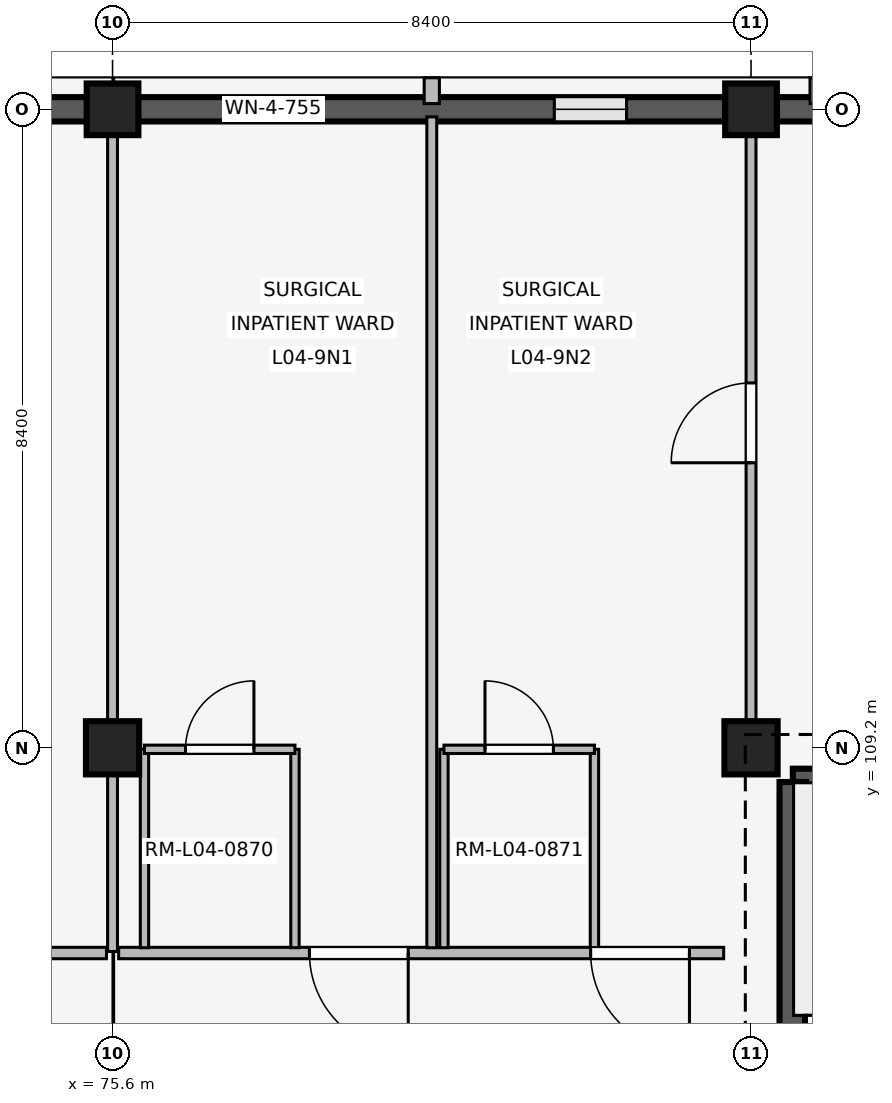
"""IFC4 building model, lengths in metres.
Left out: names, types, materials, properties, quantities, classifications, styles, units other than length and angle.
Written with IfcOpenShell. Run it as: python <this file> out.ifc"""

import sys

from ifc_helpers import new_model, si_unit, direction, frame, frame_2d, origin, origin_2d, place, context, subcontext, project, spatial, rectangle, extrude, element, fill, save


model = new_model("IFC4")
c1 = context("Model", 3, precision=1e-05, world=origin(), true_north=direction((0.0, 1.0)))
c2 = subcontext(c1, "Body", "Model", "MODEL_VIEW")
j1 = project(units=[si_unit("LENGTHUNIT", "METRE"), si_unit("PLANEANGLEUNIT", "RADIAN")], contexts=[c1])
p1 = place(None, origin())
s1 = spatial("IfcSite", under=j1, at=p1, CompositionType="ELEMENT")
p2 = place(p1, origin())
s2 = spatial("IfcBuilding", under=s1, at=p2, CompositionType="ELEMENT")
p3 = place(p2, frame((0.0, 0.0, 16.2)))
s3 = spatial("IfcBuildingStorey", under=s2, at=p3, CompositionType="ELEMENT", Elevation=16.2)
p4 = place(p3, frame((75.6, 109.2, 0.0), z_axis=(0.0, 0.0, 1.0), x_axis=(1.0, 0.0, 0.0)))
e1 = element("IfcColumn", 1, at=p4, inside=s3, PredefinedType="COLUMN", context=c2, shape_type="SweptSolid", body=[
    extrude(rectangle(XDim=0.7, YDim=0.7, at=origin_2d()), origin(), (0.0, 0.0, 1.0), 4.2),
])
p5 = place(p3, frame((75.6, 117.6, 0.0), z_axis=(0.0, 0.0, 1.0), x_axis=(1.0, 0.0, 0.0)))
e2 = element("IfcColumn", 2, at=p5, inside=s3, PredefinedType="COLUMN", context=c2, shape_type="SweptSolid", body=[
    extrude(rectangle(XDim=0.68, YDim=0.68, at=origin_2d()), origin(), (0.0, 0.0, 1.0), 4.2),
])
p6 = place(p3, frame((84.0, 109.2, 0.0), z_axis=(0.0, 0.0, 1.0), x_axis=(1.0, 0.0, 0.0)))
e3 = element("IfcColumn", 3, at=p6, inside=s3, PredefinedType="COLUMN", context=c2, shape_type="SweptSolid", body=[
    extrude(rectangle(XDim=0.7, YDim=0.7, at=origin_2d()), origin(), (0.0, 0.0, 1.0), 4.2),
])
p7 = place(p3, frame((84.0, 117.6, 0.0), z_axis=(0.0, 0.0, 1.0), x_axis=(1.0, 0.0, 0.0)))
e4 = element("IfcColumn", 4, at=p7, inside=s3, PredefinedType="COLUMN", context=c2, shape_type="SweptSolid", body=[
    extrude(rectangle(XDim=0.68, YDim=0.68, at=origin_2d()), origin(), (0.0, 0.0, 1.0), 4.2),
])
p8 = place(p3, frame((67.535, 117.6, 0.0), z_axis=(0.0, 0.0, 1.0), x_axis=(1.0, 0.0, 0.0)))
e5 = element("IfcWall", 5, at=p8, inside=s3, PredefinedType="SOLIDWALL", context=c2, shape_type="SweptSolid", body=[
    extrude(rectangle(XDim=7.73, YDim=0.32, at=frame_2d((3.865, 0.0))), origin(), (0.0, 0.0, 1.0), 3.32),
])
p9 = place(p8, frame((1.453, 0.0, 0.85)))
e6 = element("IfcOpeningElement", 6, at=p9, cuts=e5, PredefinedType="OPENING", context=c2, shape_type="SweptSolid", body=[
    extrude(rectangle(XDim=0.65, YDim=1.75, at=frame_2d((0.325, 0.875))), frame((0.0, 0.17, 0.0), z_axis=(0.0, -1.0, 0.0), x_axis=(1.0, 0.0, 0.0)), (0.0, 0.0, 1.0), 0.34),
])
p10 = place(p8, frame((5.627, 0.0, 0.85)))
e7 = element("IfcOpeningElement", 7, at=p10, cuts=e5, PredefinedType="OPENING", context=c2, shape_type="SweptSolid", body=[
    extrude(rectangle(XDim=0.65, YDim=1.75, at=frame_2d((0.325, 0.875))), frame((0.0, 0.17, 0.0), z_axis=(0.0, -1.0, 0.0), x_axis=(1.0, 0.0, 0.0)), (0.0, 0.0, 1.0), 0.34),
])
p11 = place(p3, frame((75.935, 117.6, 0.0), z_axis=(0.0, 0.0, 1.0), x_axis=(1.0, 0.0, 0.0)))
e8 = element("IfcWall", 8, at=p11, inside=s3, PredefinedType="SOLIDWALL", context=c2, shape_type="SweptSolid", body=[
    extrude(rectangle(XDim=7.73, YDim=0.32, at=frame_2d((3.865, 0.0))), origin(), (0.0, 0.0, 1.0), 3.32),
])
p12 = place(p11, frame((1.303, 0.0, 0.85)))
e9 = element("IfcOpeningElement", 9, at=p12, cuts=e8, PredefinedType="OPENING", context=c2, shape_type="SweptSolid", body=[
    extrude(rectangle(XDim=0.95, YDim=1.6, at=frame_2d((0.475, 0.8))), frame((0.0, 0.17, 0.0), z_axis=(0.0, -1.0, 0.0), x_axis=(1.0, 0.0, 0.0)), (0.0, 0.0, 1.0), 0.34),
])
p13 = place(p11, frame((5.477, 0.0, 0.85)))
e10 = element("IfcOpeningElement", 10, at=p13, cuts=e8, PredefinedType="OPENING", context=c2, shape_type="SweptSolid", body=[
    extrude(rectangle(XDim=0.95, YDim=1.6, at=frame_2d((0.475, 0.8))), frame((0.0, 0.17, 0.0), z_axis=(0.0, -1.0, 0.0), x_axis=(1.0, 0.0, 0.0)), (0.0, 0.0, 1.0), 0.34),
])
p14 = place(p3, frame((79.8, 117.675, 0.0), z_axis=(0.0, 0.0, 1.0), x_axis=(0.0, 1.0, 0.0)))
e11 = element("IfcWall", 11, at=p14, inside=s3, PredefinedType="ELEMENTEDWALL", context=c2, shape_type="SweptSolid", body=[
    extrude(rectangle(XDim=0.34, YDim=0.2, at=frame_2d((0.17, 0.0))), origin(), (0.0, 0.0, 1.0), 3.3),
])
p15 = place(p3, frame((84.335, 117.6, 0.0), z_axis=(0.0, 0.0, 1.0), x_axis=(1.0, 0.0, 0.0)))
e12 = element("IfcWall", 12, at=p15, inside=s3, PredefinedType="SOLIDWALL", context=c2, shape_type="SweptSolid", body=[
    extrude(rectangle(XDim=7.73, YDim=0.32, at=frame_2d((3.865, 0.0))), origin(), (0.0, 0.0, 1.0), 3.32),
])
p16 = place(p15, frame((1.228, 0.0, 0.85)))
e13 = element("IfcOpeningElement", 13, at=p16, cuts=e12, PredefinedType="OPENING", context=c2, shape_type="SweptSolid", body=[
    extrude(rectangle(XDim=1.1, YDim=1.6, at=frame_2d((0.55, 0.8))), frame((0.0, 0.17, 0.0), z_axis=(0.0, -1.0, 0.0), x_axis=(1.0, 0.0, 0.0)), (0.0, 0.0, 1.0), 0.34),
])
p17 = place(p15, frame((5.402, 0.0, 0.85)))
e14 = element("IfcOpeningElement", 14, at=p17, cuts=e12, PredefinedType="OPENING", context=c2, shape_type="SweptSolid", body=[
    extrude(rectangle(XDim=1.1, YDim=1.6, at=frame_2d((0.55, 0.8))), frame((0.0, 0.17, 0.0), z_axis=(0.0, -1.0, 0.0), x_axis=(1.0, 0.0, 0.0)), (0.0, 0.0, 1.0), 0.34),
])
p18 = place(p3, frame((84.876, 117.675, 0.0), z_axis=(0.0, 0.0, 1.0), x_axis=(0.0, 1.0, 0.0)))
e15 = element("IfcWall", 15, at=p18, inside=s3, PredefinedType="ELEMENTEDWALL", context=c2, shape_type="SweptSolid", body=[
    extrude(rectangle(XDim=0.34, YDim=0.2, at=frame_2d((0.17, 0.0))), origin(), (0.0, 0.0, 1.0), 3.3),
])
p19 = place(p3, frame((84.55, 108.75, 0.0), z_axis=(0.0, 0.0, 1.0), x_axis=(1.0, 0.0, 0.0)))
e16 = element("IfcWall", 16, at=p19, inside=s3, PredefinedType="SHEAR", context=c2, shape_type="SweptSolid", body=[
    extrude(rectangle(XDim=7.5, YDim=0.35, at=frame_2d((3.75, 0.0))), origin(), (0.0, 0.0, 1.0), 3.92),
])
p20 = place(p3, frame((84.55, 101.2, 0.0), z_axis=(0.0, 0.0, 1.0), x_axis=(0.0, 1.0, 0.0)))
e17 = element("IfcWall", 17, at=p20, inside=s3, PredefinedType="SHEAR", context=c2, shape_type="SweptSolid", body=[
    extrude(rectangle(XDim=7.55, YDim=0.35, at=frame_2d((3.775, 0.0))), origin(), (0.0, 0.0, 1.0), 3.92),
])
p21 = place(p20, frame((0.28, 0.0, 0.0)))
e18 = element("IfcOpeningElement", 18, at=p21, cuts=e17, PredefinedType="OPENING", context=c2, shape_type="SweptSolid", body=[
    extrude(rectangle(XDim=1.0, YDim=2.15, at=frame_2d((0.5, 1.075))), frame((0.0, 0.185, 0.0), z_axis=(0.0, -1.0, 0.0), x_axis=(1.0, 0.0, 0.0)), (0.0, 0.0, 1.0), 0.37),
])
p22 = place(p3, frame((75.52, 106.5, 0.0), z_axis=(0.0, 0.0, 1.0), x_axis=(-1.0, 0.0, 0.0)))
e19 = element("IfcWall", 19, at=p22, inside=s3, PredefinedType="PARTITIONING", context=c2, shape_type="SweptSolid", body=[
    extrude(rectangle(XDim=8.24, YDim=0.15, at=frame_2d((4.12, 0.0))), origin(), (0.0, 0.0, 1.0), 3.3),
])
p23 = place(p22, frame((3.495, 0.0, 0.0)))
e20 = element("IfcOpeningElement", 20, at=p23, cuts=e19, PredefinedType="OPENING", context=c2, shape_type="SweptSolid", body=[
    extrude(rectangle(XDim=1.25, YDim=2.2, at=frame_2d((0.625, 1.1))), frame((0.0, 0.085, 0.0), z_axis=(0.0, -1.0, 0.0), x_axis=(1.0, 0.0, 0.0)), (0.0, 0.0, 1.0), 0.17),
])
p24 = place(p3, frame((75.6, 106.52, 0.0), z_axis=(0.0, 0.0, 1.0), x_axis=(0.0, 1.0, 0.0)))
e21 = element("IfcWall", 21, at=p24, inside=s3, PredefinedType="PARTITIONING", context=c2, shape_type="SweptSolid", body=[
    extrude(rectangle(XDim=10.94, YDim=0.13, at=frame_2d((5.47, 0.0))), origin(), (0.0, 0.0, 1.0), 3.3),
])
p25 = place(p3, frame((83.64, 106.5, 0.0), z_axis=(0.0, 0.0, 1.0), x_axis=(-1.0, 0.0, 0.0)))
e22 = element("IfcWall", 22, at=p25, inside=s3, PredefinedType="PARTITIONING", context=c2, shape_type="SweptSolid", body=[
    extrude(rectangle(XDim=7.96, YDim=0.15, at=frame_2d((3.98, 0.0))), origin(), (0.0, 0.0, 1.0), 3.3),
])
p26 = place(p25, frame((0.45, 0.0, 0.0)))
e23 = element("IfcOpeningElement", 23, at=p26, cuts=e22, PredefinedType="OPENING", context=c2, shape_type="SweptSolid", body=[
    extrude(rectangle(XDim=1.3, YDim=2.25, at=frame_2d((0.65, 1.125))), frame((0.0, 0.085, 0.0), z_axis=(0.0, -1.0, 0.0), x_axis=(1.0, 0.0, 0.0)), (0.0, 0.0, 1.0), 0.17),
])
p27 = place(p25, frame((4.15, 0.0, 0.0)))
e24 = element("IfcOpeningElement", 24, at=p27, cuts=e22, PredefinedType="OPENING", context=c2, shape_type="SweptSolid", body=[
    extrude(rectangle(XDim=1.3, YDim=2.25, at=frame_2d((0.65, 1.125))), frame((0.0, 0.085, 0.0), z_axis=(0.0, -1.0, 0.0), x_axis=(1.0, 0.0, 0.0)), (0.0, 0.0, 1.0), 0.17),
])
p28 = place(p3, frame((79.8, 106.57, 0.0), z_axis=(0.0, 0.0, 1.0), x_axis=(0.0, 1.0, 0.0)))
e25 = element("IfcWall", 25, at=p28, inside=s3, PredefinedType="PARTITIONING", context=c2, shape_type="SweptSolid", body=[
    extrude(rectangle(XDim=10.93, YDim=0.13, at=frame_2d((5.465, 0.0))), origin(), (0.0, 0.0, 1.0), 3.3),
])
for number, where, z_axis, x_axis in (
    (26, (76.02, 106.57, 0.0), (0.0, 0.0, 1.0), (0.0, 1.0, 0.0)),
    (27, (78.0, 106.57, 0.0), (0.0, 0.0, 1.0), (0.0, 1.0, 0.0)),
):
    element("IfcWall", number, at=place(p3, frame(where, z_axis=z_axis, x_axis=x_axis)), inside=s3, PredefinedType="PARTITIONING", context=c2, shape_type="SweptSolid", body=[
        extrude(rectangle(XDim=2.61, YDim=0.11, at=frame_2d((1.305, 0.0))), origin(), (0.0, 0.0, 1.0), 3.3),
    ])
p29 = place(p3, frame((76.02, 109.18, 0.0), z_axis=(0.0, 0.0, 1.0), x_axis=(1.0, 0.0, 0.0)))
e28 = element("IfcWall", 28, at=p29, inside=s3, PredefinedType="PARTITIONING", context=c2, shape_type="SweptSolid", body=[
    extrude(rectangle(XDim=1.98, YDim=0.11, at=frame_2d((0.99, 0.0))), origin(), (0.0, 0.0, 1.0), 3.3),
])
p30 = place(p29, frame((0.54, 0.0, 0.0)))
e29 = element("IfcOpeningElement", 29, at=p30, cuts=e28, PredefinedType="OPENING", context=c2, shape_type="SweptSolid", body=[
    extrude(rectangle(XDim=0.9, YDim=2.1, at=frame_2d((0.45, 1.05))), frame((0.0, 0.065, 0.0), z_axis=(0.0, -1.0, 0.0), x_axis=(1.0, 0.0, 0.0)), (0.0, 0.0, 1.0), 0.13),
])
for number, where, z_axis, x_axis in (
    (30, (79.96, 106.57, 0.0), (0.0, 0.0, 1.0), (0.0, 1.0, 0.0)),
    (31, (81.94, 106.57, 0.0), (0.0, 0.0, 1.0), (0.0, 1.0, 0.0)),
):
    element("IfcWall", number, at=place(p3, frame(where, z_axis=z_axis, x_axis=x_axis)), inside=s3, PredefinedType="PARTITIONING", context=c2, shape_type="SweptSolid", body=[
        extrude(rectangle(XDim=2.61, YDim=0.11, at=frame_2d((1.305, 0.0))), origin(), (0.0, 0.0, 1.0), 3.3),
    ])
p31 = place(p3, frame((79.96, 109.18, 0.0), z_axis=(0.0, 0.0, 1.0), x_axis=(1.0, 0.0, 0.0)))
e32 = element("IfcWall", 32, at=p31, inside=s3, PredefinedType="PARTITIONING", context=c2, shape_type="SweptSolid", body=[
    extrude(rectangle(XDim=1.98, YDim=0.11, at=frame_2d((0.99, 0.0))), origin(), (0.0, 0.0, 1.0), 3.3),
])
p32 = place(p31, frame((0.54, 0.0, 0.0)))
e33 = element("IfcOpeningElement", 33, at=p32, cuts=e32, PredefinedType="OPENING", context=c2, shape_type="SweptSolid", body=[
    extrude(rectangle(XDim=0.9, YDim=2.1, at=frame_2d((0.45, 1.05))), frame((0.0, 0.065, 0.0), z_axis=(0.0, -1.0, 0.0), x_axis=(1.0, 0.0, 0.0)), (0.0, 0.0, 1.0), 0.13),
])
p33 = place(p3, frame((84.0, 109.55, 0.0), z_axis=(0.0, 0.0, 1.0), x_axis=(0.0, 1.0, 0.0)))
e34 = element("IfcWall", 34, at=p33, inside=s3, PredefinedType="PARTITIONING", context=c2, shape_type="SweptSolid", body=[
    extrude(rectangle(XDim=7.91, YDim=0.13, at=frame_2d((3.955, 0.0))), origin(), (0.0, 0.0, 1.0), 3.3),
])
p34 = place(p33, frame((3.4, 0.0, 0.0)))
e35 = element("IfcOpeningElement", 35, at=p34, cuts=e34, PredefinedType="OPENING", context=c2, shape_type="SweptSolid", body=[
    extrude(rectangle(XDim=1.05, YDim=2.2, at=frame_2d((0.525, 1.1))), frame((0.0, 0.075, 0.0), z_axis=(0.0, -1.0, 0.0), x_axis=(1.0, 0.0, 0.0)), (0.0, 0.0, 1.0), 0.15),
])
p35 = place(p12, origin())
e36 = element("IfcWindow", 36, at=p35, inside=s3, PartitioningType="SINGLE_PANEL", PredefinedType="WINDOW", context=c2, shape_type="SweptSolid", body=[
    extrude(rectangle(XDim=0.95, YDim=1.6, at=frame_2d((0.475, 0.8))), frame((0.0, 0.03, 0.0), z_axis=(0.0, -1.0, 0.0), x_axis=(1.0, 0.0, 0.0)), (0.0, 0.0, 1.0), 0.06),
])
fill(e9, e36)
p36 = place(p13, origin())
e37 = element("IfcWindow", 37, at=p36, inside=s3, PartitioningType="SINGLE_PANEL", PredefinedType="WINDOW", context=c2, shape_type="SweptSolid", body=[
    extrude(rectangle(XDim=0.95, YDim=1.6, at=frame_2d((0.475, 0.8))), frame((0.0, 0.03, 0.0), z_axis=(0.0, -1.0, 0.0), x_axis=(1.0, 0.0, 0.0)), (0.0, 0.0, 1.0), 0.06),
])
fill(e10, e37)
p37 = place(p26, origin())
e38 = element("IfcDoor", 38, at=p37, inside=s3, OperationType="SINGLE_SWING_LEFT", PredefinedType="DOOR", context=c2, shape_type="SweptSolid", body=[
    extrude(rectangle(XDim=1.3, YDim=2.25, at=frame_2d((0.65, 1.125))), frame((0.0, 0.025, 0.0), z_axis=(0.0, -1.0, 0.0), x_axis=(1.0, 0.0, 0.0)), (0.0, 0.0, 1.0), 0.05),
])
fill(e23, e38)
p38 = place(p27, origin())
e39 = element("IfcDoor", 39, at=p38, inside=s3, OperationType="SINGLE_SWING_LEFT", PredefinedType="DOOR", context=c2, shape_type="SweptSolid", body=[
    extrude(rectangle(XDim=1.3, YDim=2.25, at=frame_2d((0.65, 1.125))), frame((0.0, 0.025, 0.0), z_axis=(0.0, -1.0, 0.0), x_axis=(1.0, 0.0, 0.0)), (0.0, 0.0, 1.0), 0.05),
])
fill(e24, e39)
p39 = place(p30, origin())
e40 = element("IfcDoor", 40, at=p39, inside=s3, OperationType="SINGLE_SWING_RIGHT", PredefinedType="DOOR", context=c2, shape_type="SweptSolid", body=[
    extrude(rectangle(XDim=0.9, YDim=2.1, at=frame_2d((0.45, 1.05))), frame((0.0, 0.025, 0.0), z_axis=(0.0, -1.0, 0.0), x_axis=(1.0, 0.0, 0.0)), (0.0, 0.0, 1.0), 0.05),
])
fill(e29, e40)
p40 = place(p32, origin())
e41 = element("IfcDoor", 41, at=p40, inside=s3, OperationType="SINGLE_SWING_LEFT", PredefinedType="DOOR", context=c2, shape_type="SweptSolid", body=[
    extrude(rectangle(XDim=0.9, YDim=2.1, at=frame_2d((0.45, 1.05))), frame((0.0, 0.025, 0.0), z_axis=(0.0, -1.0, 0.0), x_axis=(1.0, 0.0, 0.0)), (0.0, 0.0, 1.0), 0.05),
])
fill(e33, e41)
p41 = place(p34, origin())
e42 = element("IfcDoor", 42, at=p41, inside=s3, OperationType="SINGLE_SWING_LEFT", PredefinedType="DOOR", context=c2, shape_type="SweptSolid", body=[
    extrude(rectangle(XDim=1.05, YDim=2.2, at=frame_2d((0.525, 1.1))), frame((0.0, 0.025, 0.0), z_axis=(0.0, -1.0, 0.0), x_axis=(1.0, 0.0, 0.0)), (0.0, 0.0, 1.0), 0.05),
])
fill(e35, e42)
save(model, sys.argv[1])
